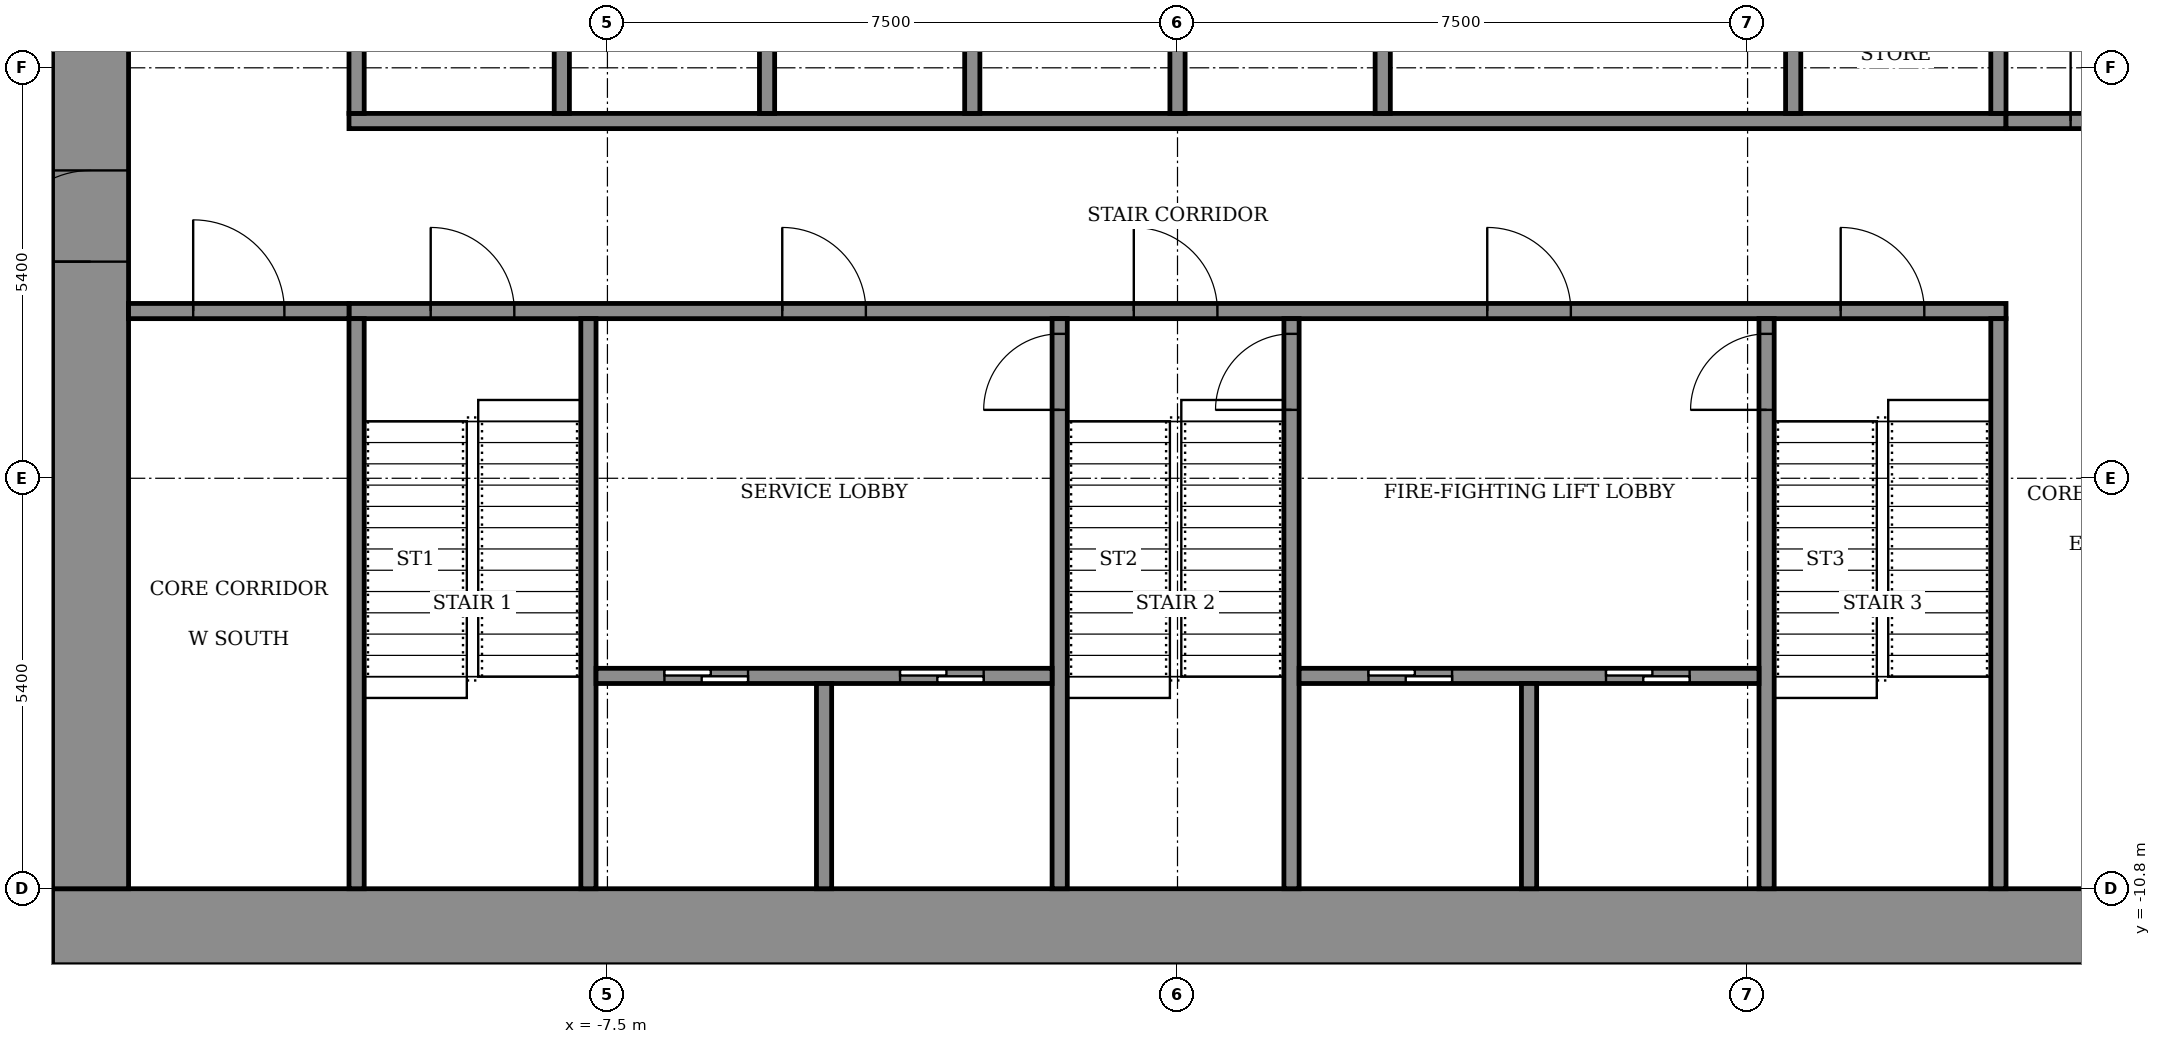
"""IFC4 building model, lengths in metres.
Left out: names, types, materials, properties, quantities, classifications, styles, units other than length and angle.
Written with IfcOpenShell. Run it as: python <this file> out.ifc"""

import sys

from ifc_helpers import new_model, si_unit, direction, frame, frame_2d, origin, place, context, subcontext, project, spatial, rectangle, extrude, element, fill, save


model = new_model("IFC4")
c1 = context("Model", 3, precision=1e-05, world=origin(), true_north=direction((0.0, 1.0)))
c2 = subcontext(c1, "Body", "Model", "MODEL_VIEW")
j1 = project(units=[si_unit("LENGTHUNIT", "METRE"), si_unit("PLANEANGLEUNIT", "RADIAN")], contexts=[c1])
p1 = place(None, origin())
s1 = spatial("IfcSite", under=j1, at=p1, CompositionType="ELEMENT")
p2 = place(p1, origin())
s2 = spatial("IfcBuilding", under=s1, at=p2, CompositionType="ELEMENT")
p3 = place(p2, frame((0.0, 0.0, 97.3)))
s3 = spatial("IfcBuildingStorey", under=s2, at=p3, CompositionType="ELEMENT", Elevation=97.3)
p4 = place(p3, frame((-14.8, -11.3, 0.0), z_axis=(0.0, 0.0, 1.0), x_axis=(1.0, 0.0, 0.0)))
e1 = element("IfcWall", 1, at=p4, inside=s3, PredefinedType="SHEAR", context=c2, shape_type="SweptSolid", body=[
    extrude(rectangle(XDim=29.6, YDim=1.0, at=frame_2d((14.8, 0.0))), origin(), (0.0, 0.0, 1.0), 4.6),
])
p5 = place(p3, frame((-14.3, -10.8, 0.0), z_axis=(0.0, 0.0, 1.0), x_axis=(0.0, 1.0, 0.0)))
e2 = element("IfcWall", 2, at=p5, inside=s3, PredefinedType="SHEAR", context=c2, shape_type="SweptSolid", body=[
    extrude(rectangle(XDim=21.6, YDim=1.0, at=frame_2d((10.8, 0.0))), origin(), (0.0, 0.0, 1.0), 4.6),
])
p6 = place(p5, frame((8.25, 0.0, 0.0)))
e3 = element("IfcOpeningElement", 3, at=p6, cuts=e2, PredefinedType="OPENING", context=c2, shape_type="SweptSolid", body=[
    extrude(rectangle(XDim=1.2, YDim=2.1, at=frame_2d((0.6, 1.05))), frame((0.0, 0.51, 0.0), z_axis=(0.0, -1.0, 0.0), x_axis=(1.0, 0.0, 0.0)), (0.0, 0.0, 1.0), 1.02),
])
p7 = place(p5, frame((15.25, 0.0, 0.0)))
e4 = element("IfcOpeningElement", 4, at=p7, cuts=e2, PredefinedType="OPENING", context=c2, shape_type="SweptSolid", body=[
    extrude(rectangle(XDim=1.2, YDim=2.1, at=frame_2d((0.6, 1.05))), frame((0.0, 0.51, 0.0), z_axis=(0.0, -1.0, 0.0), x_axis=(1.0, 0.0, 0.0)), (0.0, 0.0, 1.0), 1.02),
])
p8 = place(p3, frame((-10.9, -3.2, 0.0), z_axis=(0.0, 0.0, 1.0), x_axis=(1.0, 0.0, 0.0)))
e5 = element("IfcWall", 5, at=p8, inside=s3, PredefinedType="SHEAR", context=c2, shape_type="SweptSolid", body=[
    extrude(rectangle(XDim=21.8, YDim=0.2, at=frame_2d((10.9, 0.0))), origin(), (0.0, 0.0, 1.0), 4.05),
])
p9 = place(p8, frame((1.075, 0.0, 0.0)))
e6 = element("IfcOpeningElement", 6, at=p9, cuts=e5, PredefinedType="OPENING", context=c2, shape_type="SweptSolid", body=[
    extrude(rectangle(XDim=1.1, YDim=2.1, at=frame_2d((0.55, 1.05))), frame((0.0, 0.11, 0.0), z_axis=(0.0, -1.0, 0.0), x_axis=(1.0, 0.0, 0.0)), (0.0, 0.0, 1.0), 0.22),
])
p10 = place(p8, frame((10.325, 0.0, 0.0)))
e7 = element("IfcOpeningElement", 7, at=p10, cuts=e5, PredefinedType="OPENING", context=c2, shape_type="SweptSolid", body=[
    extrude(rectangle(XDim=1.1, YDim=2.1, at=frame_2d((0.55, 1.05))), frame((0.0, 0.11, 0.0), z_axis=(0.0, -1.0, 0.0), x_axis=(1.0, 0.0, 0.0)), (0.0, 0.0, 1.0), 0.22),
])
p11 = place(p8, frame((19.625, 0.0, 0.0)))
e8 = element("IfcOpeningElement", 8, at=p11, cuts=e5, PredefinedType="OPENING", context=c2, shape_type="SweptSolid", body=[
    extrude(rectangle(XDim=1.1, YDim=2.1, at=frame_2d((0.55, 1.05))), frame((0.0, 0.11, 0.0), z_axis=(0.0, -1.0, 0.0), x_axis=(1.0, 0.0, 0.0)), (0.0, 0.0, 1.0), 0.22),
])
p12 = place(p8, frame((5.7, 0.0, 0.0)))
e9 = element("IfcOpeningElement", 9, at=p12, cuts=e5, PredefinedType="OPENING", context=c2, shape_type="SweptSolid", body=[
    extrude(rectangle(XDim=1.1, YDim=2.1, at=frame_2d((0.55, 1.05))), frame((0.0, 0.11, 0.0), z_axis=(0.0, -1.0, 0.0), x_axis=(1.0, 0.0, 0.0)), (0.0, 0.0, 1.0), 0.22),
])
p13 = place(p8, frame((14.975, 0.0, 0.0)))
e10 = element("IfcOpeningElement", 10, at=p13, cuts=e5, PredefinedType="OPENING", context=c2, shape_type="SweptSolid", body=[
    extrude(rectangle(XDim=1.1, YDim=2.1, at=frame_2d((0.55, 1.05))), frame((0.0, 0.11, 0.0), z_axis=(0.0, -1.0, 0.0), x_axis=(1.0, 0.0, 0.0)), (0.0, 0.0, 1.0), 0.22),
])
p14 = place(p3, frame((-10.9, -0.7, 0.0), z_axis=(0.0, 0.0, 1.0), x_axis=(1.0, 0.0, 0.0)))
e11 = element("IfcWall", 11, at=p14, inside=s3, PredefinedType="SHEAR", context=c2, shape_type="SweptSolid", body=[
    extrude(rectangle(XDim=21.8, YDim=0.2, at=frame_2d((10.9, 0.0))), origin(), (0.0, 0.0, 1.0), 4.05),
])
for number, where, z_axis, x_axis in (
    (12, (-10.8, -10.8, 0.0), (0.0, 0.0, 1.0), (0.0, 1.0, 0.0)),
    (13, (-7.75, -10.8, 0.0), (0.0, 0.0, 1.0), (0.0, 1.0, 0.0)),
):
    element("IfcWall", number, at=place(p3, frame(where, z_axis=z_axis, x_axis=x_axis)), inside=s3, PredefinedType="SHEAR", context=c2, shape_type="SweptSolid", body=[
        extrude(rectangle(XDim=7.5, YDim=0.2, at=frame_2d((3.75, 0.0))), origin(), (0.0, 0.0, 1.0), 4.05),
    ])
p15 = place(p3, frame((-1.55, -10.8, 0.0), z_axis=(0.0, 0.0, 1.0), x_axis=(0.0, 1.0, 0.0)))
e14 = element("IfcWall", 14, at=p15, inside=s3, PredefinedType="SHEAR", context=c2, shape_type="SweptSolid", body=[
    extrude(rectangle(XDim=7.5, YDim=0.2, at=frame_2d((3.75, 0.0))), origin(), (0.0, 0.0, 1.0), 4.05),
])
p16 = place(p15, frame((6.3, 0.0, 0.0)))
e15 = element("IfcOpeningElement", 15, at=p16, cuts=e14, PredefinedType="OPENING", context=c2, shape_type="SweptSolid", body=[
    extrude(rectangle(XDim=1.0, YDim=2.1, at=frame_2d((0.5, 1.05))), frame((0.0, 0.11, 0.0), z_axis=(0.0, -1.0, 0.0), x_axis=(1.0, 0.0, 0.0)), (0.0, 0.0, 1.0), 0.22),
])
p17 = place(p3, frame((1.5, -10.8, 0.0), z_axis=(0.0, 0.0, 1.0), x_axis=(0.0, 1.0, 0.0)))
e16 = element("IfcWall", 16, at=p17, inside=s3, PredefinedType="SHEAR", context=c2, shape_type="SweptSolid", body=[
    extrude(rectangle(XDim=7.5, YDim=0.2, at=frame_2d((3.75, 0.0))), origin(), (0.0, 0.0, 1.0), 4.05),
])
p18 = place(p17, frame((6.3, 0.0, 0.0)))
e17 = element("IfcOpeningElement", 17, at=p18, cuts=e16, PredefinedType="OPENING", context=c2, shape_type="SweptSolid", body=[
    extrude(rectangle(XDim=1.0, YDim=2.1, at=frame_2d((0.5, 1.05))), frame((0.0, 0.11, 0.0), z_axis=(0.0, -1.0, 0.0), x_axis=(1.0, 0.0, 0.0)), (0.0, 0.0, 1.0), 0.22),
])
p19 = place(p3, frame((7.75, -10.8, 0.0), z_axis=(0.0, 0.0, 1.0), x_axis=(0.0, 1.0, 0.0)))
e18 = element("IfcWall", 18, at=p19, inside=s3, PredefinedType="SHEAR", context=c2, shape_type="SweptSolid", body=[
    extrude(rectangle(XDim=7.5, YDim=0.2, at=frame_2d((3.75, 0.0))), origin(), (0.0, 0.0, 1.0), 4.05),
])
p20 = place(p19, frame((6.3, 0.0, 0.0)))
e19 = element("IfcOpeningElement", 19, at=p20, cuts=e18, PredefinedType="OPENING", context=c2, shape_type="SweptSolid", body=[
    extrude(rectangle(XDim=1.0, YDim=2.1, at=frame_2d((0.5, 1.05))), frame((0.0, 0.11, 0.0), z_axis=(0.0, -1.0, 0.0), x_axis=(1.0, 0.0, 0.0)), (0.0, 0.0, 1.0), 0.22),
])
p21 = place(p3, frame((10.8, -10.8, 0.0), z_axis=(0.0, 0.0, 1.0), x_axis=(0.0, 1.0, 0.0)))
e20 = element("IfcWall", 20, at=p21, inside=s3, PredefinedType="SHEAR", context=c2, shape_type="SweptSolid", body=[
    extrude(rectangle(XDim=7.5, YDim=0.2, at=frame_2d((3.75, 0.0))), origin(), (0.0, 0.0, 1.0), 4.05),
])
p22 = place(p3, frame((-7.65, -8.0, 0.0), z_axis=(0.0, 0.0, 1.0), x_axis=(1.0, 0.0, 0.0)))
e21 = element("IfcWall", 21, at=p22, inside=s3, PredefinedType="SHEAR", context=c2, shape_type="SweptSolid", body=[
    extrude(rectangle(XDim=6.0, YDim=0.2, at=frame_2d((3.0, 0.0))), origin(), (0.0, 0.0, 1.0), 4.05),
])
p23 = place(p22, frame((0.9, 0.0, 0.0)))
e22 = element("IfcOpeningElement", 22, at=p23, cuts=e21, PredefinedType="OPENING", context=c2, shape_type="SweptSolid", body=[
    extrude(rectangle(XDim=1.1, YDim=2.1, at=frame_2d((0.55, 1.05))), frame((0.0, 0.11, 0.0), z_axis=(0.0, -1.0, 0.0), x_axis=(1.0, 0.0, 0.0)), (0.0, 0.0, 1.0), 0.22),
])
p24 = place(p22, frame((4.0, 0.0, 0.0)))
e23 = element("IfcOpeningElement", 23, at=p24, cuts=e21, PredefinedType="OPENING", context=c2, shape_type="SweptSolid", body=[
    extrude(rectangle(XDim=1.1, YDim=2.1, at=frame_2d((0.55, 1.05))), frame((0.0, 0.11, 0.0), z_axis=(0.0, -1.0, 0.0), x_axis=(1.0, 0.0, 0.0)), (0.0, 0.0, 1.0), 0.22),
])
p25 = place(p3, frame((-4.65, -10.8, 0.0), z_axis=(0.0, 0.0, 1.0), x_axis=(0.0, 1.0, 0.0)))
e24 = element("IfcWall", 24, at=p25, inside=s3, PredefinedType="SHEAR", context=c2, shape_type="SweptSolid", body=[
    extrude(rectangle(XDim=2.7, YDim=0.2, at=frame_2d((1.35, 0.0))), origin(), (0.0, 0.0, 1.0), 4.05),
])
p26 = place(p3, frame((1.6, -8.0, 0.0), z_axis=(0.0, 0.0, 1.0), x_axis=(1.0, 0.0, 0.0)))
e25 = element("IfcWall", 25, at=p26, inside=s3, PredefinedType="SHEAR", context=c2, shape_type="SweptSolid", body=[
    extrude(rectangle(XDim=6.05, YDim=0.2, at=frame_2d((3.025, 0.0))), origin(), (0.0, 0.0, 1.0), 4.05),
])
p27 = place(p26, frame((0.913, 0.0, 0.0)))
e26 = element("IfcOpeningElement", 26, at=p27, cuts=e25, PredefinedType="OPENING", context=c2, shape_type="SweptSolid", body=[
    extrude(rectangle(XDim=1.1, YDim=2.1, at=frame_2d((0.55, 1.05))), frame((0.0, 0.11, 0.0), z_axis=(0.0, -1.0, 0.0), x_axis=(1.0, 0.0, 0.0)), (0.0, 0.0, 1.0), 0.22),
])
p28 = place(p26, frame((4.038, 0.0, 0.0)))
e27 = element("IfcOpeningElement", 27, at=p28, cuts=e25, PredefinedType="OPENING", context=c2, shape_type="SweptSolid", body=[
    extrude(rectangle(XDim=1.1, YDim=2.1, at=frame_2d((0.55, 1.05))), frame((0.0, 0.11, 0.0), z_axis=(0.0, -1.0, 0.0), x_axis=(1.0, 0.0, 0.0)), (0.0, 0.0, 1.0), 0.22),
])
p29 = place(p3, frame((4.625, -10.8, 0.0), z_axis=(0.0, 0.0, 1.0), x_axis=(0.0, 1.0, 0.0)))
e28 = element("IfcWall", 28, at=p29, inside=s3, PredefinedType="SHEAR", context=c2, shape_type="SweptSolid", body=[
    extrude(rectangle(XDim=2.7, YDim=0.2, at=frame_2d((1.35, 0.0))), origin(), (0.0, 0.0, 1.0), 4.05),
])
for number, where, z_axis, x_axis in (
    (29, (-10.8, -0.6, 0.0), (0.0, 0.0, 1.0), (0.0, 1.0, 0.0)),
    (30, (-8.1, -0.6, 0.0), (0.0, 0.0, 1.0), (0.0, 1.0, 0.0)),
    (31, (-5.4, -0.6, 0.0), (0.0, 0.0, 1.0), (0.0, 1.0, 0.0)),
    (32, (-2.7, -0.6, 0.0), (0.0, 0.0, 1.0), (0.0, 1.0, 0.0)),
    (33, (0.0, -0.6, 0.0), (0.0, 0.0, 1.0), (0.0, 1.0, 0.0)),
    (34, (2.7, -0.6, 0.0), (0.0, 0.0, 1.0), (0.0, 1.0, 0.0)),
):
    element("IfcWall", number, at=place(p3, frame(where, z_axis=z_axis, x_axis=x_axis)), inside=s3, PredefinedType="SHEAR", context=c2, shape_type="SweptSolid", body=[
        extrude(rectangle(XDim=2.5, YDim=0.2, at=frame_2d((1.25, 0.0))), origin(), (0.0, 0.0, 1.0), 4.05),
    ])
for number, where, z_axis, x_axis in (
    (35, (8.1, -0.6, 0.0), (0.0, 0.0, 1.0), (0.0, 1.0, 0.0)),
    (36, (10.8, -0.6, 0.0), (0.0, 0.0, 1.0), (0.0, 1.0, 0.0)),
):
    element("IfcWall", number, at=place(p3, frame(where, z_axis=z_axis, x_axis=x_axis)), inside=s3, PredefinedType="STANDARD", context=c2, shape_type="SweptSolid", body=[
        extrude(rectangle(XDim=2.5, YDim=0.2, at=frame_2d((1.25, 0.0))), origin(), (0.0, 0.0, 1.0), 4.05),
    ])
p30 = place(p3, frame((-13.8, -3.2, 0.0), z_axis=(0.0, 0.0, 1.0), x_axis=(1.0, 0.0, 0.0)))
e37 = element("IfcWall", 37, at=p30, inside=s3, PredefinedType="STANDARD", context=c2, shape_type="SweptSolid", body=[
    extrude(rectangle(XDim=2.9, YDim=0.2, at=frame_2d((1.45, 0.0))), origin(), (0.0, 0.0, 1.0), 4.05),
])
p31 = place(p30, frame((0.85, 0.0, 0.0)))
e38 = element("IfcOpeningElement", 38, at=p31, cuts=e37, PredefinedType="OPENING", context=c2, shape_type="SweptSolid", body=[
    extrude(rectangle(XDim=1.2, YDim=2.1, at=frame_2d((0.6, 1.05))), frame((0.0, 0.11, 0.0), z_axis=(0.0, -1.0, 0.0), x_axis=(1.0, 0.0, 0.0)), (0.0, 0.0, 1.0), 0.22),
])
p32 = place(p3, frame((10.9, -0.7, 0.0), z_axis=(0.0, 0.0, 1.0), x_axis=(1.0, 0.0, 0.0)))
e39 = element("IfcWall", 39, at=p32, inside=s3, PredefinedType="STANDARD", context=c2, shape_type="SweptSolid", body=[
    extrude(rectangle(XDim=2.9, YDim=0.2, at=frame_2d((1.45, 0.0))), origin(), (0.0, 0.0, 1.0), 4.05),
])
p33 = place(p32, frame((0.85, 0.0, 0.0)))
e40 = element("IfcOpeningElement", 40, at=p33, cuts=e39, PredefinedType="OPENING", context=c2, shape_type="SweptSolid", body=[
    extrude(rectangle(XDim=1.2, YDim=2.1, at=frame_2d((0.6, 1.05))), frame((0.0, 0.11, 0.0), z_axis=(0.0, -1.0, 0.0), x_axis=(1.0, 0.0, 0.0)), (0.0, 0.0, 1.0), 0.22),
])
p34 = place(p6, origin())
e41 = element("IfcDoor", 41, at=p34, inside=s3, OperationType="DOUBLE_DOOR_SINGLE_SWING", PredefinedType="DOOR", context=c2, shape_type="SweptSolid", body=[
    extrude(rectangle(XDim=1.2, YDim=2.1, at=frame_2d((0.6, 1.05))), frame((0.0, 0.025, 0.0), z_axis=(0.0, -1.0, 0.0), x_axis=(1.0, 0.0, 0.0)), (0.0, 0.0, 1.0), 0.05),
])
fill(e3, e41)
p35 = place(p27, origin())
e42 = element("IfcDoor", 42, at=p35, inside=s3, OperationType="SLIDING_TO_LEFT", PredefinedType="DOOR", context=c2, shape_type="SweptSolid", body=[
    extrude(rectangle(XDim=1.1, YDim=2.1, at=frame_2d((0.55, 1.05))), frame((0.0, 0.025, 0.0), z_axis=(0.0, -1.0, 0.0), x_axis=(1.0, 0.0, 0.0)), (0.0, 0.0, 1.0), 0.05),
])
fill(e26, e42)
p36 = place(p23, origin())
e43 = element("IfcDoor", 43, at=p36, inside=s3, OperationType="SLIDING_TO_LEFT", PredefinedType="DOOR", context=c2, shape_type="SweptSolid", body=[
    extrude(rectangle(XDim=1.1, YDim=2.1, at=frame_2d((0.55, 1.05))), frame((0.0, 0.025, 0.0), z_axis=(0.0, -1.0, 0.0), x_axis=(1.0, 0.0, 0.0)), (0.0, 0.0, 1.0), 0.05),
])
fill(e22, e43)
p37 = place(p28, origin())
e44 = element("IfcDoor", 44, at=p37, inside=s3, OperationType="SLIDING_TO_LEFT", PredefinedType="DOOR", context=c2, shape_type="SweptSolid", body=[
    extrude(rectangle(XDim=1.1, YDim=2.1, at=frame_2d((0.55, 1.05))), frame((0.0, 0.025, 0.0), z_axis=(0.0, -1.0, 0.0), x_axis=(1.0, 0.0, 0.0)), (0.0, 0.0, 1.0), 0.05),
])
fill(e27, e44)
p38 = place(p24, origin())
e45 = element("IfcDoor", 45, at=p38, inside=s3, OperationType="SLIDING_TO_LEFT", PredefinedType="DOOR", context=c2, shape_type="SweptSolid", body=[
    extrude(rectangle(XDim=1.1, YDim=2.1, at=frame_2d((0.55, 1.05))), frame((0.0, 0.025, 0.0), z_axis=(0.0, -1.0, 0.0), x_axis=(1.0, 0.0, 0.0)), (0.0, 0.0, 1.0), 0.05),
])
fill(e23, e45)
p39 = place(p9, origin())
e46 = element("IfcDoor", 46, at=p39, inside=s3, OperationType="SINGLE_SWING_RIGHT", PredefinedType="DOOR", context=c2, shape_type="SweptSolid", body=[
    extrude(rectangle(XDim=1.1, YDim=2.1, at=frame_2d((0.55, 1.05))), frame((0.0, 0.025, 0.0), z_axis=(0.0, -1.0, 0.0), x_axis=(1.0, 0.0, 0.0)), (0.0, 0.0, 1.0), 0.05),
])
fill(e6, e46)
p40 = place(p10, origin())
e47 = element("IfcDoor", 47, at=p40, inside=s3, OperationType="SINGLE_SWING_RIGHT", PredefinedType="DOOR", context=c2, shape_type="SweptSolid", body=[
    extrude(rectangle(XDim=1.1, YDim=2.1, at=frame_2d((0.55, 1.05))), frame((0.0, 0.025, 0.0), z_axis=(0.0, -1.0, 0.0), x_axis=(1.0, 0.0, 0.0)), (0.0, 0.0, 1.0), 0.05),
])
fill(e7, e47)
p41 = place(p11, origin())
e48 = element("IfcDoor", 48, at=p41, inside=s3, OperationType="SINGLE_SWING_RIGHT", PredefinedType="DOOR", context=c2, shape_type="SweptSolid", body=[
    extrude(rectangle(XDim=1.1, YDim=2.1, at=frame_2d((0.55, 1.05))), frame((0.0, 0.025, 0.0), z_axis=(0.0, -1.0, 0.0), x_axis=(1.0, 0.0, 0.0)), (0.0, 0.0, 1.0), 0.05),
])
fill(e8, e48)
p42 = place(p12, origin())
e49 = element("IfcDoor", 49, at=p42, inside=s3, OperationType="SINGLE_SWING_LEFT", PredefinedType="DOOR", context=c2, shape_type="SweptSolid", body=[
    extrude(rectangle(XDim=1.1, YDim=2.1, at=frame_2d((0.55, 1.05))), frame((0.0, 0.025, 0.0), z_axis=(0.0, -1.0, 0.0), x_axis=(1.0, 0.0, 0.0)), (0.0, 0.0, 1.0), 0.05),
])
fill(e9, e49)
p43 = place(p13, origin())
e50 = element("IfcDoor", 50, at=p43, inside=s3, OperationType="SINGLE_SWING_LEFT", PredefinedType="DOOR", context=c2, shape_type="SweptSolid", body=[
    extrude(rectangle(XDim=1.1, YDim=2.1, at=frame_2d((0.55, 1.05))), frame((0.0, 0.025, 0.0), z_axis=(0.0, -1.0, 0.0), x_axis=(1.0, 0.0, 0.0)), (0.0, 0.0, 1.0), 0.05),
])
fill(e10, e50)
p44 = place(p16, origin())
e51 = element("IfcDoor", 51, at=p44, inside=s3, OperationType="SINGLE_SWING_RIGHT", PredefinedType="DOOR", context=c2, shape_type="SweptSolid", body=[
    extrude(rectangle(XDim=1.0, YDim=2.1, at=frame_2d((0.5, 1.05))), frame((0.0, 0.025, 0.0), z_axis=(0.0, -1.0, 0.0), x_axis=(1.0, 0.0, 0.0)), (0.0, 0.0, 1.0), 0.05),
])
fill(e15, e51)
p45 = place(p18, origin())
e52 = element("IfcDoor", 52, at=p45, inside=s3, OperationType="SINGLE_SWING_RIGHT", PredefinedType="DOOR", context=c2, shape_type="SweptSolid", body=[
    extrude(rectangle(XDim=1.0, YDim=2.1, at=frame_2d((0.5, 1.05))), frame((0.0, 0.025, 0.0), z_axis=(0.0, -1.0, 0.0), x_axis=(1.0, 0.0, 0.0)), (0.0, 0.0, 1.0), 0.05),
])
fill(e17, e52)
p46 = place(p20, origin())
e53 = element("IfcDoor", 53, at=p46, inside=s3, OperationType="SINGLE_SWING_RIGHT", PredefinedType="DOOR", context=c2, shape_type="SweptSolid", body=[
    extrude(rectangle(XDim=1.0, YDim=2.1, at=frame_2d((0.5, 1.05))), frame((0.0, 0.025, 0.0), z_axis=(0.0, -1.0, 0.0), x_axis=(1.0, 0.0, 0.0)), (0.0, 0.0, 1.0), 0.05),
])
fill(e19, e53)
p47 = place(p31, origin())
e54 = element("IfcDoor", 54, at=p47, inside=s3, OperationType="SINGLE_SWING_LEFT", PredefinedType="DOOR", context=c2, shape_type="SweptSolid", body=[
    extrude(rectangle(XDim=1.2, YDim=2.1, at=frame_2d((0.6, 1.05))), frame((0.0, 0.025, 0.0), z_axis=(0.0, -1.0, 0.0), x_axis=(1.0, 0.0, 0.0)), (0.0, 0.0, 1.0), 0.05),
])
fill(e38, e54)
p48 = place(p33, origin())
e55 = element("IfcDoor", 55, at=p48, inside=s3, OperationType="SINGLE_SWING_LEFT", PredefinedType="DOOR", context=c2, shape_type="SweptSolid", body=[
    extrude(rectangle(XDim=1.2, YDim=2.1, at=frame_2d((0.6, 1.05))), frame((0.0, 0.025, 0.0), z_axis=(0.0, -1.0, 0.0), x_axis=(1.0, 0.0, 0.0)), (0.0, 0.0, 1.0), 0.05),
])
fill(e40, e55)
save(model, sys.argv[1])
